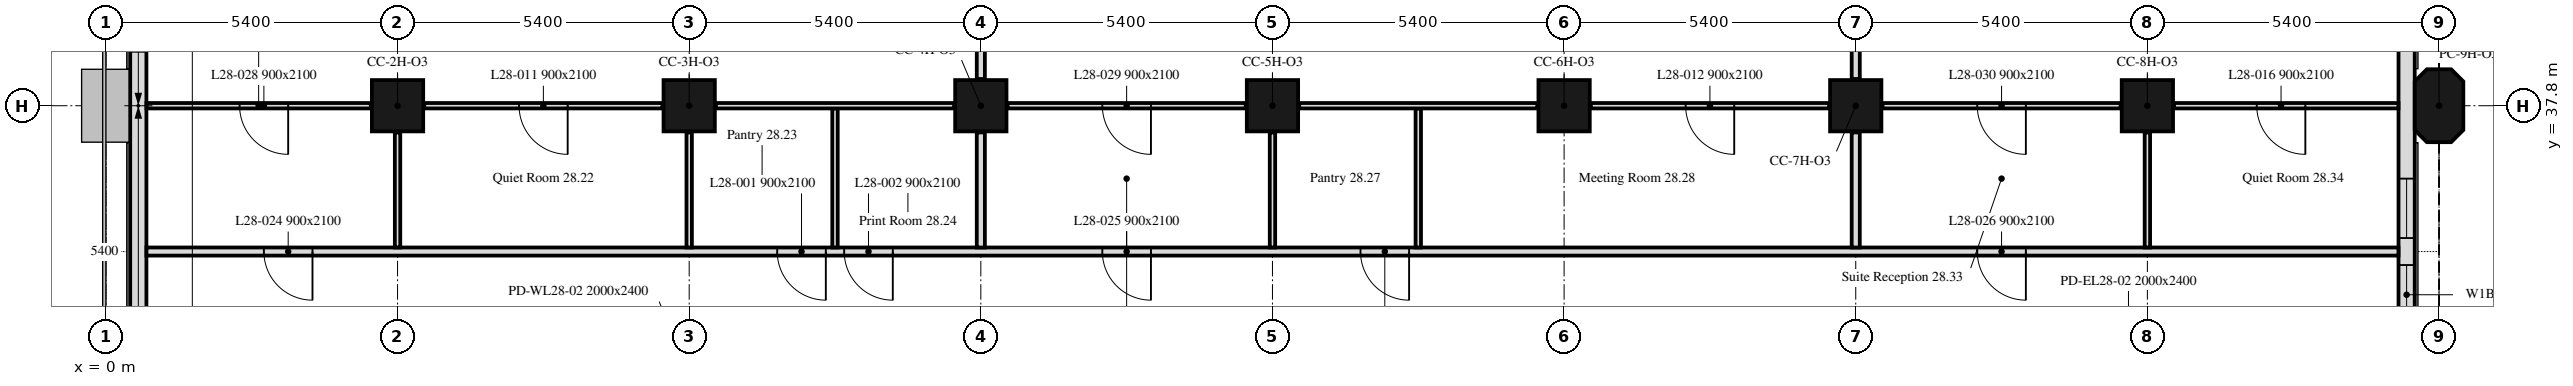
"""IFC4 building model, lengths in metres.
Left out: names, types, materials, properties, quantities, classifications, styles, units other than length and angle.
Written with IfcOpenShell. Run it as: python <this file> out.ifc"""

import sys

from ifc_helpers import new_model, si_unit, direction, frame, frame_2d, origin, origin_2d, place, context, subcontext, project, spatial, polyline, rectangle, outline, extrude, element, fill, save


model = new_model("IFC4")
c1 = context("Model", 3, precision=1e-05, world=origin(), true_north=direction((0.0, 1.0)))
c2 = subcontext(c1, "Body", "Model", "MODEL_VIEW")
j1 = project(units=[si_unit("LENGTHUNIT", "METRE"), si_unit("PLANEANGLEUNIT", "RADIAN")], contexts=[c1])
p1 = place(None, origin())
s1 = spatial("IfcSite", under=j1, at=p1, CompositionType="ELEMENT")
p2 = place(p1, origin())
s2 = spatial("IfcBuilding", under=s1, at=p2, CompositionType="ELEMENT")
p3 = place(p2, frame((0.0, 0.0, 118.2)))
s3 = spatial("IfcBuildingStorey", under=s2, at=p3, CompositionType="ELEMENT", Elevation=118.2)
for number, where, z_axis, x_axis in (
    (1, (5.4, 37.8, 0.0), (0.0, 0.0, 1.0), (1.0, 0.0, 0.0)),
    (2, (10.8, 37.8, 0.0), (0.0, 0.0, 1.0), (1.0, 0.0, 0.0)),
    (3, (16.2, 37.8, 0.0), (0.0, 0.0, 1.0), (1.0, 0.0, 0.0)),
    (4, (21.6, 37.8, 0.0), (0.0, 0.0, 1.0), (1.0, 0.0, 0.0)),
    (5, (27.0, 37.8, 0.0), (0.0, 0.0, 1.0), (1.0, 0.0, 0.0)),
    (6, (32.4, 37.8, 0.0), (0.0, 0.0, 1.0), (1.0, 0.0, 0.0)),
    (7, (37.8, 37.8, 0.0), (0.0, 0.0, 1.0), (1.0, 0.0, 0.0)),
):
    element("IfcColumn", number, at=place(p3, frame(where, z_axis=z_axis, x_axis=x_axis)), inside=s3, PredefinedType="COLUMN", context=c2, shape_type="SweptSolid", body=[
        extrude(rectangle(XDim=0.95, YDim=0.95, at=origin_2d()), origin(), (0.0, 0.0, 1.0), 3.5),
    ])
p4 = place(p3, frame((43.2, 37.8, 0.0), z_axis=(0.0, 0.0, 1.0), x_axis=(0.0, 1.0, 0.0)))
e8 = element("IfcColumn", 8, at=p4, inside=s3, PredefinedType="COLUMN", context=c2, shape_type="SweptSolid", body=[
    extrude(outline(polyline([(-0.45, -0.45), (0.45, -0.45), (0.675, -0.225), (0.675, 0.225), (0.45, 0.45), (-0.45, 0.45), (-0.675, 0.225), (-0.675, -0.225), (-0.45, -0.45)])), origin(), (0.0, 0.0, 1.0), 3.5),
])
p5 = place(p3, frame((42.6, 32.4, 0.0), z_axis=(0.0, 0.0, 1.0), x_axis=(0.0, 1.0, 0.0)))
e9 = element("IfcWall", 9, at=p5, inside=s3, PredefinedType="SOLIDWALL", context=c2, shape_type="SweptSolid", body=[
    extrude(rectangle(XDim=10.614, YDim=0.3, at=frame_2d((5.307, 0.0))), origin(), (0.0, 0.0, 1.0), 3.5),
])
p6 = place(p5, frame((1.35, 0.0, 0.9)))
e10 = element("IfcOpeningElement", 10, at=p6, cuts=e9, PredefinedType="OPENING", context=c2, shape_type="SweptSolid", body=[
    extrude(rectangle(XDim=1.1, YDim=1.7, at=frame_2d((0.55, 0.85))), frame((0.0, 0.16, 0.0), z_axis=(0.0, -1.0, 0.0), x_axis=(1.0, 0.0, 0.0)), (0.0, 0.0, 1.0), 0.32),
])
p7 = place(p5, frame((2.95, 0.0, 0.9)))
e11 = element("IfcOpeningElement", 11, at=p7, cuts=e9, PredefinedType="OPENING", context=c2, shape_type="SweptSolid", body=[
    extrude(rectangle(XDim=1.1, YDim=1.7, at=frame_2d((0.55, 0.85))), frame((0.0, 0.16, 0.0), z_axis=(0.0, -1.0, 0.0), x_axis=(1.0, 0.0, 0.0)), (0.0, 0.0, 1.0), 0.32),
])
p8 = place(p3, frame((0.6, 43.014, 0.0), z_axis=(0.0, 0.0, 1.0), x_axis=(0.0, -1.0, 0.0)))
e12 = element("IfcWall", 12, at=p8, inside=s3, PredefinedType="SOLIDWALL", context=c2, shape_type="SweptSolid", body=[
    extrude(rectangle(XDim=32.027, YDim=0.3, at=frame_2d((16.014, 0.0))), origin(), (0.0, 0.0, 1.0), 3.5),
])
p9 = place(p8, frame((0.814, 0.0, 0.9)))
e13 = element("IfcOpeningElement", 13, at=p9, cuts=e12, PredefinedType="OPENING", context=c2, shape_type="SweptSolid", body=[
    extrude(rectangle(XDim=3.4, YDim=1.7, at=frame_2d((1.7, 0.85))), frame((0.0, 0.16, 0.0), z_axis=(0.0, -1.0, 0.0), x_axis=(1.0, 0.0, 0.0)), (0.0, 0.0, 1.0), 0.32),
])
p10 = place(p8, frame((11.614, 0.0, 0.9)))
e14 = element("IfcOpeningElement", 14, at=p10, cuts=e12, PredefinedType="OPENING", context=c2, shape_type="SweptSolid", body=[
    extrude(rectangle(XDim=3.4, YDim=1.7, at=frame_2d((1.7, 0.85))), frame((0.0, 0.16, 0.0), z_axis=(0.0, -1.0, 0.0), x_axis=(1.0, 0.0, 0.0)), (0.0, 0.0, 1.0), 0.32),
])
p11 = place(p8, frame((22.414, 0.0, 0.9)))
e15 = element("IfcOpeningElement", 15, at=p11, cuts=e12, PredefinedType="OPENING", context=c2, shape_type="SweptSolid", body=[
    extrude(rectangle(XDim=3.4, YDim=1.7, at=frame_2d((1.7, 0.85))), frame((0.0, 0.16, 0.0), z_axis=(0.0, -1.0, 0.0), x_axis=(1.0, 0.0, 0.0)), (0.0, 0.0, 1.0), 0.32),
])
p12 = place(p3, frame((42.449, 35.1, 0.0), z_axis=(0.0, 0.0, 1.0), x_axis=(-1.0, 0.0, 0.0)))
e16 = element("IfcWall", 16, at=p12, inside=s3, PredefinedType="PARTITIONING", context=c2, shape_type="SweptSolid", body=[
    extrude(rectangle(XDim=41.698, YDim=0.15, at=frame_2d((20.849, 0.0))), origin(), (0.0, 0.0, 1.0), 2.75),
])
p13 = place(p12, frame((29.119, 0.0, 0.0)))
e17 = element("IfcOpeningElement", 17, at=p13, cuts=e16, PredefinedType="OPENING", context=c2, shape_type="SweptSolid", body=[
    extrude(rectangle(XDim=0.9, YDim=2.1, at=frame_2d((0.45, 1.05))), frame((0.0, 0.075, 0.0), z_axis=(0.0, -1.0, 0.0), x_axis=(1.0, 0.0, 0.0)), (0.0, 0.0, 1.0), 0.15),
])
p14 = place(p12, frame((27.879, 0.0, 0.0)))
e18 = element("IfcOpeningElement", 18, at=p14, cuts=e16, PredefinedType="OPENING", context=c2, shape_type="SweptSolid", body=[
    extrude(rectangle(XDim=0.9, YDim=2.1, at=frame_2d((0.45, 1.05))), frame((0.0, 0.075, 0.0), z_axis=(0.0, -1.0, 0.0), x_axis=(1.0, 0.0, 0.0)), (0.0, 0.0, 1.0), 0.15),
])
p15 = place(p12, frame((18.319, 0.0, 0.0)))
e19 = element("IfcOpeningElement", 19, at=p15, cuts=e16, PredefinedType="OPENING", context=c2, shape_type="SweptSolid", body=[
    extrude(rectangle(XDim=0.9, YDim=2.1, at=frame_2d((0.45, 1.05))), frame((0.0, 0.075, 0.0), z_axis=(0.0, -1.0, 0.0), x_axis=(1.0, 0.0, 0.0)), (0.0, 0.0, 1.0), 0.15),
])
p16 = place(p12, frame((38.624, 0.0, 0.0)))
e20 = element("IfcOpeningElement", 20, at=p16, cuts=e16, PredefinedType="OPENING", context=c2, shape_type="SweptSolid", body=[
    extrude(rectangle(XDim=0.9, YDim=2.1, at=frame_2d((0.45, 1.05))), frame((0.0, 0.075, 0.0), z_axis=(0.0, -1.0, 0.0), x_axis=(1.0, 0.0, 0.0)), (0.0, 0.0, 1.0), 0.15),
])
p17 = place(p12, frame((23.099, 0.0, 0.0)))
e21 = element("IfcOpeningElement", 21, at=p17, cuts=e16, PredefinedType="OPENING", context=c2, shape_type="SweptSolid", body=[
    extrude(rectangle(XDim=0.9, YDim=2.1, at=frame_2d((0.45, 1.05))), frame((0.0, 0.075, 0.0), z_axis=(0.0, -1.0, 0.0), x_axis=(1.0, 0.0, 0.0)), (0.0, 0.0, 1.0), 0.15),
])
p18 = place(p12, frame((6.899, 0.0, 0.0)))
e22 = element("IfcOpeningElement", 22, at=p18, cuts=e16, PredefinedType="OPENING", context=c2, shape_type="SweptSolid", body=[
    extrude(rectangle(XDim=0.9, YDim=2.1, at=frame_2d((0.45, 1.05))), frame((0.0, 0.075, 0.0), z_axis=(0.0, -1.0, 0.0), x_axis=(1.0, 0.0, 0.0)), (0.0, 0.0, 1.0), 0.15),
])
p19 = place(p3, frame((4.905, 37.8, 0.0), z_axis=(0.0, 0.0, 1.0), x_axis=(-1.0, 0.0, 0.0)))
e23 = element("IfcWall", 23, at=p19, inside=s3, PredefinedType="PARTITIONING", context=c2, shape_type="SweptSolid", body=[
    extrude(rectangle(XDim=4.154, YDim=0.1, at=frame_2d((2.077, 0.0))), origin(), (0.0, 0.0, 1.0), 2.75),
])
p20 = place(p19, frame((1.53, 0.0, 0.0)))
e24 = element("IfcOpeningElement", 24, at=p20, cuts=e23, PredefinedType="OPENING", context=c2, shape_type="SweptSolid", body=[
    extrude(rectangle(XDim=0.9, YDim=2.1, at=frame_2d((0.45, 1.05))), frame((0.0, 0.05, 0.0), z_axis=(0.0, -1.0, 0.0), x_axis=(1.0, 0.0, 0.0)), (0.0, 0.0, 1.0), 0.1),
])
p21 = place(p3, frame((5.4, 35.175, 0.0), z_axis=(0.0, 0.0, 1.0), x_axis=(0.0, 1.0, 0.0)))
e25 = element("IfcWall", 25, at=p21, inside=s3, PredefinedType="PARTITIONING", context=c2, shape_type="SweptSolid", body=[
    extrude(rectangle(XDim=2.13, YDim=0.1, at=frame_2d((1.065, 0.0))), origin(), (0.0, 0.0, 1.0), 3.5),
])
p22 = place(p3, frame((10.8, 35.175, 0.0), z_axis=(0.0, 0.0, 1.0), x_axis=(0.0, 1.0, 0.0)))
e26 = element("IfcWall", 26, at=p22, inside=s3, PredefinedType="PARTITIONING", context=c2, shape_type="SweptSolid", body=[
    extrude(rectangle(XDim=2.13, YDim=0.1, at=frame_2d((1.065, 0.0))), origin(), (0.0, 0.0, 1.0), 2.75),
])
p23 = place(p3, frame((10.305, 37.8, 0.0), z_axis=(0.0, 0.0, 1.0), x_axis=(-1.0, 0.0, 0.0)))
e27 = element("IfcWall", 27, at=p23, inside=s3, PredefinedType="PARTITIONING", context=c2, shape_type="SweptSolid", body=[
    extrude(rectangle(XDim=4.41, YDim=0.1, at=frame_2d((2.205, 0.0))), origin(), (0.0, 0.0, 1.0), 2.75),
])
p24 = place(p23, frame((1.755, 0.0, 0.0)))
e28 = element("IfcOpeningElement", 28, at=p24, cuts=e27, PredefinedType="OPENING", context=c2, shape_type="SweptSolid", body=[
    extrude(rectangle(XDim=0.9, YDim=2.1, at=frame_2d((0.45, 1.05))), frame((0.0, 0.05, 0.0), z_axis=(0.0, -1.0, 0.0), x_axis=(1.0, 0.0, 0.0)), (0.0, 0.0, 1.0), 0.1),
])
p25 = place(p3, frame((13.5, 35.175, 0.0), z_axis=(0.0, 0.0, 1.0), x_axis=(0.0, 1.0, 0.0)))
e29 = element("IfcWall", 29, at=p25, inside=s3, PredefinedType="PARTITIONING", context=c2, shape_type="SweptSolid", body=[
    extrude(rectangle(XDim=2.575, YDim=0.1, at=frame_2d((1.288, 0.0))), origin(), (0.0, 0.0, 1.0), 3.5),
])
p26 = place(p3, frame((16.2, 35.175, 0.0), z_axis=(0.0, 0.0, 1.0), x_axis=(0.0, 1.0, 0.0)))
e30 = element("IfcWall", 30, at=p26, inside=s3, PredefinedType="PARTITIONING", context=c2, shape_type="SweptSolid", body=[
    extrude(rectangle(XDim=2.13, YDim=0.15, at=frame_2d((1.065, 0.0))), origin(), (0.0, 0.0, 1.0), 2.75),
])
p27 = place(p3, frame((15.705, 37.8, 0.0), z_axis=(0.0, 0.0, 1.0), x_axis=(-1.0, 0.0, 0.0)))
e31 = element("IfcWall", 31, at=p27, inside=s3, PredefinedType="PARTITIONING", context=c2, shape_type="SweptSolid", body=[
    extrude(rectangle(XDim=4.41, YDim=0.1, at=frame_2d((2.205, 0.0))), origin(), (0.0, 0.0, 1.0), 2.75),
])
p28 = place(p3, frame((16.2, 38.295, 0.0), z_axis=(0.0, 0.0, 1.0), x_axis=(0.0, 1.0, 0.0)))
e32 = element("IfcWall", 32, at=p28, inside=s3, PredefinedType="PARTITIONING", context=c2, shape_type="SweptSolid", body=[
    extrude(rectangle(XDim=4.41, YDim=0.15, at=frame_2d((2.205, 0.0))), origin(), (0.0, 0.0, 1.0), 2.75),
])
p29 = place(p3, frame((21.6, 35.175, 0.0), z_axis=(0.0, 0.0, 1.0), x_axis=(0.0, 1.0, 0.0)))
e33 = element("IfcWall", 33, at=p29, inside=s3, PredefinedType="PARTITIONING", context=c2, shape_type="SweptSolid", body=[
    extrude(rectangle(XDim=2.13, YDim=0.1, at=frame_2d((1.065, 0.0))), origin(), (0.0, 0.0, 1.0), 2.75),
])
p30 = place(p3, frame((21.105, 37.8, 0.0), z_axis=(0.0, 0.0, 1.0), x_axis=(-1.0, 0.0, 0.0)))
e34 = element("IfcWall", 34, at=p30, inside=s3, PredefinedType="PARTITIONING", context=c2, shape_type="SweptSolid", body=[
    extrude(rectangle(XDim=4.41, YDim=0.1, at=frame_2d((2.205, 0.0))), origin(), (0.0, 0.0, 1.0), 3.5),
])
p31 = place(p30, frame((1.755, 0.0, 0.0)))
e35 = element("IfcOpeningElement", 35, at=p31, cuts=e34, PredefinedType="OPENING", context=c2, shape_type="SweptSolid", body=[
    extrude(rectangle(XDim=0.9, YDim=2.1, at=frame_2d((0.45, 1.05))), frame((0.0, 0.05, 0.0), z_axis=(0.0, -1.0, 0.0), x_axis=(1.0, 0.0, 0.0)), (0.0, 0.0, 1.0), 0.1),
])
p32 = place(p3, frame((24.3, 35.175, 0.0), z_axis=(0.0, 0.0, 1.0), x_axis=(0.0, 1.0, 0.0)))
e36 = element("IfcWall", 36, at=p32, inside=s3, PredefinedType="PARTITIONING", context=c2, shape_type="SweptSolid", body=[
    extrude(rectangle(XDim=2.575, YDim=0.1, at=frame_2d((1.288, 0.0))), origin(), (0.0, 0.0, 1.0), 3.5),
])
p33 = place(p3, frame((32.4, 35.175, 0.0), z_axis=(0.0, 0.0, 1.0), x_axis=(0.0, 1.0, 0.0)))
e37 = element("IfcWall", 37, at=p33, inside=s3, PredefinedType="PARTITIONING", context=c2, shape_type="SweptSolid", body=[
    extrude(rectangle(XDim=2.13, YDim=0.15, at=frame_2d((1.065, 0.0))), origin(), (0.0, 0.0, 1.0), 2.75),
])
p34 = place(p3, frame((31.905, 37.8, 0.0), z_axis=(0.0, 0.0, 1.0), x_axis=(-1.0, 0.0, 0.0)))
e38 = element("IfcWall", 38, at=p34, inside=s3, PredefinedType="PARTITIONING", context=c2, shape_type="SweptSolid", body=[
    extrude(rectangle(XDim=4.41, YDim=0.1, at=frame_2d((2.205, 0.0))), origin(), (0.0, 0.0, 1.0), 3.5),
])
p35 = place(p34, frame((1.755, 0.0, 0.0)))
e39 = element("IfcOpeningElement", 39, at=p35, cuts=e38, PredefinedType="OPENING", context=c2, shape_type="SweptSolid", body=[
    extrude(rectangle(XDim=0.9, YDim=2.1, at=frame_2d((0.45, 1.05))), frame((0.0, 0.05, 0.0), z_axis=(0.0, -1.0, 0.0), x_axis=(1.0, 0.0, 0.0)), (0.0, 0.0, 1.0), 0.1),
])
p36 = place(p3, frame((26.505, 37.8, 0.0), z_axis=(0.0, 0.0, 1.0), x_axis=(-1.0, 0.0, 0.0)))
e40 = element("IfcWall", 40, at=p36, inside=s3, PredefinedType="PARTITIONING", context=c2, shape_type="SweptSolid", body=[
    extrude(rectangle(XDim=4.41, YDim=0.1, at=frame_2d((2.205, 0.0))), origin(), (0.0, 0.0, 1.0), 3.5),
])
p37 = place(p3, frame((32.4, 38.295, 0.0), z_axis=(0.0, 0.0, 1.0), x_axis=(0.0, 1.0, 0.0)))
e41 = element("IfcWall", 41, at=p37, inside=s3, PredefinedType="PARTITIONING", context=c2, shape_type="SweptSolid", body=[
    extrude(rectangle(XDim=4.41, YDim=0.15, at=frame_2d((2.205, 0.0))), origin(), (0.0, 0.0, 1.0), 2.75),
])
p38 = place(p3, frame((37.8, 35.175, 0.0), z_axis=(0.0, 0.0, 1.0), x_axis=(0.0, 1.0, 0.0)))
e42 = element("IfcWall", 42, at=p38, inside=s3, PredefinedType="PARTITIONING", context=c2, shape_type="SweptSolid", body=[
    extrude(rectangle(XDim=2.13, YDim=0.1, at=frame_2d((1.065, 0.0))), origin(), (0.0, 0.0, 1.0), 3.5),
])
p39 = place(p3, frame((37.305, 37.8, 0.0), z_axis=(0.0, 0.0, 1.0), x_axis=(-1.0, 0.0, 0.0)))
e43 = element("IfcWall", 43, at=p39, inside=s3, PredefinedType="PARTITIONING", context=c2, shape_type="SweptSolid", body=[
    extrude(rectangle(XDim=4.41, YDim=0.1, at=frame_2d((2.205, 0.0))), origin(), (0.0, 0.0, 1.0), 3.5),
])
p40 = place(p39, frame((1.755, 0.0, 0.0)))
e44 = element("IfcOpeningElement", 44, at=p40, cuts=e43, PredefinedType="OPENING", context=c2, shape_type="SweptSolid", body=[
    extrude(rectangle(XDim=0.9, YDim=2.1, at=frame_2d((0.45, 1.05))), frame((0.0, 0.05, 0.0), z_axis=(0.0, -1.0, 0.0), x_axis=(1.0, 0.0, 0.0)), (0.0, 0.0, 1.0), 0.1),
])
p41 = place(p3, frame((42.449, 37.8, 0.0), z_axis=(0.0, 0.0, 1.0), x_axis=(-1.0, 0.0, 0.0)))
e45 = element("IfcWall", 45, at=p41, inside=s3, PredefinedType="PARTITIONING", context=c2, shape_type="SweptSolid", body=[
    extrude(rectangle(XDim=4.154, YDim=0.1, at=frame_2d((2.077, 0.0))), origin(), (0.0, 0.0, 1.0), 3.5),
])
p42 = place(p41, frame((1.724, 0.0, 0.0)))
e46 = element("IfcOpeningElement", 46, at=p42, cuts=e45, PredefinedType="OPENING", context=c2, shape_type="SweptSolid", body=[
    extrude(rectangle(XDim=0.9, YDim=2.1, at=frame_2d((0.45, 1.05))), frame((0.0, 0.05, 0.0), z_axis=(0.0, -1.0, 0.0), x_axis=(1.0, 0.0, 0.0)), (0.0, 0.0, 1.0), 0.1),
])
p43 = place(p6, origin())
e47 = element("IfcWindow", 47, at=p43, inside=s3, PartitioningType="SINGLE_PANEL", PredefinedType="WINDOW", context=c2, shape_type="SweptSolid", body=[
    extrude(rectangle(XDim=1.1, YDim=1.7, at=frame_2d((0.55, 0.85))), frame((0.0, 0.03, 0.0), z_axis=(0.0, -1.0, 0.0), x_axis=(1.0, 0.0, 0.0)), (0.0, 0.0, 1.0), 0.06),
])
fill(e10, e47)
p44 = place(p7, origin())
e48 = element("IfcWindow", 48, at=p44, inside=s3, PartitioningType="SINGLE_PANEL", PredefinedType="WINDOW", context=c2, shape_type="SweptSolid", body=[
    extrude(rectangle(XDim=1.1, YDim=1.7, at=frame_2d((0.55, 0.85))), frame((0.0, 0.03, 0.0), z_axis=(0.0, -1.0, 0.0), x_axis=(1.0, 0.0, 0.0)), (0.0, 0.0, 1.0), 0.06),
])
fill(e11, e48)
p45 = place(p13, origin())
e49 = element("IfcDoor", 49, at=p45, inside=s3, OperationType="SINGLE_SWING_RIGHT", PredefinedType="DOOR", context=c2, shape_type="SweptSolid", body=[
    extrude(rectangle(XDim=0.9, YDim=2.1, at=frame_2d((0.45, 1.05))), frame((0.0, 0.025, 0.0), z_axis=(0.0, -1.0, 0.0), x_axis=(1.0, 0.0, 0.0)), (0.0, 0.0, 1.0), 0.05),
])
fill(e17, e49)
p46 = place(p14, origin())
e50 = element("IfcDoor", 50, at=p46, inside=s3, OperationType="SINGLE_SWING_RIGHT", PredefinedType="DOOR", context=c2, shape_type="SweptSolid", body=[
    extrude(rectangle(XDim=0.9, YDim=2.1, at=frame_2d((0.45, 1.05))), frame((0.0, 0.025, 0.0), z_axis=(0.0, -1.0, 0.0), x_axis=(1.0, 0.0, 0.0)), (0.0, 0.0, 1.0), 0.05),
])
fill(e18, e50)
p47 = place(p15, origin())
e51 = element("IfcDoor", 51, at=p47, inside=s3, OperationType="SINGLE_SWING_RIGHT", PredefinedType="DOOR", context=c2, shape_type="SweptSolid", body=[
    extrude(rectangle(XDim=0.9, YDim=2.1, at=frame_2d((0.45, 1.05))), frame((0.0, 0.025, 0.0), z_axis=(0.0, -1.0, 0.0), x_axis=(1.0, 0.0, 0.0)), (0.0, 0.0, 1.0), 0.05),
])
fill(e19, e51)
p48 = place(p24, origin())
e52 = element("IfcDoor", 52, at=p48, inside=s3, OperationType="SINGLE_SWING_LEFT", PredefinedType="DOOR", context=c2, shape_type="SweptSolid", body=[
    extrude(rectangle(XDim=0.9, YDim=2.1, at=frame_2d((0.45, 1.05))), frame((0.0, 0.025, 0.0), z_axis=(0.0, -1.0, 0.0), x_axis=(1.0, 0.0, 0.0)), (0.0, 0.0, 1.0), 0.05),
])
fill(e28, e52)
p49 = place(p35, origin())
e53 = element("IfcDoor", 53, at=p49, inside=s3, OperationType="SINGLE_SWING_RIGHT", PredefinedType="DOOR", context=c2, shape_type="SweptSolid", body=[
    extrude(rectangle(XDim=0.9, YDim=2.1, at=frame_2d((0.45, 1.05))), frame((0.0, 0.025, 0.0), z_axis=(0.0, -1.0, 0.0), x_axis=(1.0, 0.0, 0.0)), (0.0, 0.0, 1.0), 0.05),
])
fill(e39, e53)
p50 = place(p42, origin())
e54 = element("IfcDoor", 54, at=p50, inside=s3, OperationType="SINGLE_SWING_RIGHT", PredefinedType="DOOR", context=c2, shape_type="SweptSolid", body=[
    extrude(rectangle(XDim=0.9, YDim=2.1, at=frame_2d((0.45, 1.05))), frame((0.0, 0.025, 0.0), z_axis=(0.0, -1.0, 0.0), x_axis=(1.0, 0.0, 0.0)), (0.0, 0.0, 1.0), 0.05),
])
fill(e46, e54)
p51 = place(p16, origin())
e55 = element("IfcDoor", 55, at=p51, inside=s3, OperationType="SINGLE_SWING_RIGHT", PredefinedType="DOOR", context=c2, shape_type="SweptSolid", body=[
    extrude(rectangle(XDim=0.9, YDim=2.1, at=frame_2d((0.45, 1.05))), frame((0.0, 0.025, 0.0), z_axis=(0.0, -1.0, 0.0), x_axis=(1.0, 0.0, 0.0)), (0.0, 0.0, 1.0), 0.05),
])
fill(e20, e55)
p52 = place(p17, origin())
e56 = element("IfcDoor", 56, at=p52, inside=s3, OperationType="SINGLE_SWING_RIGHT", PredefinedType="DOOR", context=c2, shape_type="SweptSolid", body=[
    extrude(rectangle(XDim=0.9, YDim=2.1, at=frame_2d((0.45, 1.05))), frame((0.0, 0.025, 0.0), z_axis=(0.0, -1.0, 0.0), x_axis=(1.0, 0.0, 0.0)), (0.0, 0.0, 1.0), 0.05),
])
fill(e21, e56)
p53 = place(p18, origin())
e57 = element("IfcDoor", 57, at=p53, inside=s3, OperationType="SINGLE_SWING_RIGHT", PredefinedType="DOOR", context=c2, shape_type="SweptSolid", body=[
    extrude(rectangle(XDim=0.9, YDim=2.1, at=frame_2d((0.45, 1.05))), frame((0.0, 0.025, 0.0), z_axis=(0.0, -1.0, 0.0), x_axis=(1.0, 0.0, 0.0)), (0.0, 0.0, 1.0), 0.05),
])
fill(e22, e57)
p54 = place(p20, origin())
e58 = element("IfcDoor", 58, at=p54, inside=s3, OperationType="SINGLE_SWING_RIGHT", PredefinedType="DOOR", context=c2, shape_type="SweptSolid", body=[
    extrude(rectangle(XDim=0.9, YDim=2.1, at=frame_2d((0.45, 1.05))), frame((0.0, 0.025, 0.0), z_axis=(0.0, -1.0, 0.0), x_axis=(1.0, 0.0, 0.0)), (0.0, 0.0, 1.0), 0.05),
])
fill(e24, e58)
p55 = place(p31, origin())
e59 = element("IfcDoor", 59, at=p55, inside=s3, OperationType="SINGLE_SWING_LEFT", PredefinedType="DOOR", context=c2, shape_type="SweptSolid", body=[
    extrude(rectangle(XDim=0.9, YDim=2.1, at=frame_2d((0.45, 1.05))), frame((0.0, 0.025, 0.0), z_axis=(0.0, -1.0, 0.0), x_axis=(1.0, 0.0, 0.0)), (0.0, 0.0, 1.0), 0.05),
])
fill(e35, e59)
p56 = place(p40, origin())
e60 = element("IfcDoor", 60, at=p56, inside=s3, OperationType="SINGLE_SWING_LEFT", PredefinedType="DOOR", context=c2, shape_type="SweptSolid", body=[
    extrude(rectangle(XDim=0.9, YDim=2.1, at=frame_2d((0.45, 1.05))), frame((0.0, 0.025, 0.0), z_axis=(0.0, -1.0, 0.0), x_axis=(1.0, 0.0, 0.0)), (0.0, 0.0, 1.0), 0.05),
])
fill(e44, e60)
save(model, sys.argv[1])
